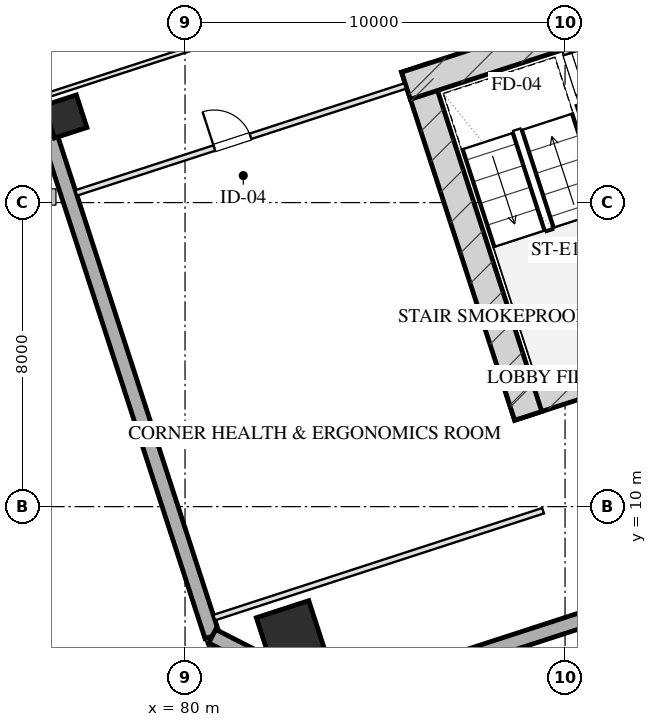
"""IFC4 building model, lengths in metres.
Left out: names, types, materials, properties, quantities, classifications, styles, units other than length and angle.
Written with IfcOpenShell. Run it as: python <this file> out.ifc"""

import sys

from ifc_helpers import new_model, si_unit, direction, frame, frame_2d, origin, origin_2d, place, context, subcontext, project, spatial, rectangle, hollow_rectangle, extrude, element, fill, save


model = new_model("IFC4")
c1 = context("Model", 3, precision=1e-05, world=origin(), true_north=direction((0.0, 1.0)))
c2 = subcontext(c1, "Body", "Model", "MODEL_VIEW")
j1 = project(units=[si_unit("LENGTHUNIT", "METRE"), si_unit("PLANEANGLEUNIT", "RADIAN")], contexts=[c1])
p1 = place(None, origin())
s1 = spatial("IfcSite", under=j1, at=p1, CompositionType="ELEMENT")
p2 = place(p1, origin())
s2 = spatial("IfcBuilding", under=s1, at=p2, CompositionType="ELEMENT")
p3 = place(p2, frame((0.0, 0.0, 88.55)))
s3 = spatial("IfcBuildingStorey", under=s2, at=p3, CompositionType="ELEMENT", Elevation=88.55)
p4 = place(p3, frame((88.559, 12.629, 0.0), z_axis=(0.0, 0.0, 1.0), x_axis=(0.951056072937, 0.309018358888, 0.0)))
e1 = element("IfcWall", 1, at=p4, inside=s3, PredefinedType="SHEAR", context=c2, shape_type="SweptSolid", body=[
    extrude(rectangle(XDim=16.55, YDim=0.75, at=frame_2d((8.275, 0.0))), origin(), (0.0, 0.0, 1.0), 3.45),
])
p5 = place(p3, frame((86.055, 21.546, 0.0), z_axis=(0.0, 0.0, 1.0), x_axis=(0.309023585745, -0.951054374604, 0.0)))
e2 = element("IfcWall", 2, at=p5, inside=s3, PredefinedType="SHEAR", context=c2, shape_type="SweptSolid", body=[
    extrude(rectangle(XDim=9.63, YDim=0.75, at=frame_2d((4.815, 0.0))), origin(), (0.0, 0.0, 1.0), 3.45),
])
p6 = place(p3, frame((85.814, 21.074, 0.0), z_axis=(0.0, 0.0, 1.0), x_axis=(0.95106580992, 0.308988390074, 0.0)))
e3 = element("IfcWall", 3, at=p6, inside=s3, PredefinedType="SHEAR", context=c2, shape_type="SweptSolid", body=[
    extrude(rectangle(XDim=4.295, YDim=0.75, at=frame_2d((2.147, 0.0))), origin(), (0.0, 0.0, 1.0), 3.45),
])
p7 = place(p3, frame((82.791, 6.612, 0.0), z_axis=(0.0, 0.0, 1.0), x_axis=(0.951056516295, 0.309016994375, 0.0)))
e4 = element("IfcColumn", 4, at=p7, inside=s3, PredefinedType="COLUMN", context=c2, shape_type="SweptSolid", body=[
    extrude(hollow_rectangle(XDim=1.45, YDim=1.45, WallThickness=0.05, at=origin_2d()), origin(), (0.0, 0.0, 1.0), 3.451),
])
p8 = place(p3, frame((76.851, 20.264, 0.0), z_axis=(0.0, 0.0, 1.0), x_axis=(0.951056516295, 0.309016994375, 0.0)))
e5 = element("IfcColumn", 5, at=p8, inside=s3, PredefinedType="COLUMN", context=c2, shape_type="SweptSolid", body=[
    extrude(hollow_rectangle(XDim=0.9, YDim=0.9, WallThickness=0.032, at=origin_2d()), origin(), (0.0, 0.0, 1.0), 3.451),
])
p9 = place(p3, frame((80.716, 6.59, 0.0), z_axis=(0.0, 0.0, 1.0), x_axis=(-0.309017542002, 0.95105633836, 0.0)))
e6 = element("IfcWall", 6, at=p9, inside=s3, PredefinedType="SOLIDWALL", context=c2, shape_type="SweptSolid", body=[
    extrude(rectangle(XDim=46.4, YDim=0.4, at=frame_2d((23.2, 0.0))), origin(), (0.0, 0.0, 1.0), 2.55),
])
p10 = place(p9, frame((28.4, 0.0, 0.75)))
e7 = element("IfcOpeningElement", 7, at=p10, cuts=e6, PredefinedType="OPENING", context=c2, shape_type="SweptSolid", body=[
    extrude(rectangle(XDim=2.4, YDim=1.4, at=frame_2d((1.2, 0.7))), frame((0.0, 0.21, 0.0), z_axis=(0.0, -1.0, 0.0), x_axis=(1.0, 0.0, 0.0)), (0.0, 0.0, 1.0), 0.42),
])
p11 = place(p9, frame((19.55, 0.0, 0.0)))
e8 = element("IfcOpeningElement", 8, at=p11, cuts=e6, PredefinedType="OPENING", context=c2, shape_type="SweptSolid", body=[
    extrude(rectangle(XDim=1.1, YDim=2.15, at=frame_2d((0.55, 1.075))), frame((0.0, 0.21, 0.0), z_axis=(0.0, -1.0, 0.0), x_axis=(1.0, 0.0, 0.0)), (0.0, 0.0, 1.0), 0.42),
])
p12 = place(p3, frame((111.953, 14.005, 0.0), z_axis=(0.0, 0.0, 1.0), x_axis=(-0.95105505922, -0.309021478754, 0.0)))
e9 = element("IfcWall", 9, at=p12, inside=s3, PredefinedType="SOLIDWALL", context=c2, shape_type="SweptSolid", body=[
    extrude(rectangle(XDim=29.4, YDim=0.4, at=frame_2d((14.7, 0.0))), origin(), (0.0, 0.0, 1.0), 2.55),
])
p13 = place(p3, frame((83.992, 4.92, 0.0), z_axis=(0.0, 0.0, 1.0), x_axis=(-0.891001999643, 0.45399937955, 0.0)))
e10 = element("IfcWall", 10, at=p13, inside=s3, PredefinedType="SOLIDWALL", context=c2, shape_type="SweptSolid", body=[
    extrude(rectangle(XDim=3.677, YDim=0.4, at=frame_2d((1.839, 0.0))), origin(), (0.0, 0.0, 1.0), 2.55),
])
p14 = place(p3, frame((89.899, 22.401, 0.0), z_axis=(0.0, 0.0, 1.0), x_axis=(0.308932062672, -0.951084108086, 0.0)))
e11 = element("IfcWall", 11, at=p14, inside=s3, PredefinedType="PARTITIONING", context=c2, shape_type="SweptSolid", body=[
    extrude(rectangle(XDim=1.9, YDim=0.2, at=frame_2d((0.95, 0.0))), origin(), (0.0, 0.0, 1.0), 3.155),
])
p15 = place(p14, frame((0.52, 0.0, 0.0)))
e12 = element("IfcOpeningElement", 12, at=p15, cuts=e11, PredefinedType="OPENING", context=c2, shape_type="SweptSolid", body=[
    extrude(rectangle(XDim=1.1, YDim=2.05, at=frame_2d((0.55, 1.025))), frame((0.0, 0.11, 0.0), z_axis=(0.0, -1.0, 0.0), x_axis=(1.0, 0.0, 0.0)), (0.0, 0.0, 1.0), 0.22),
])
p16 = place(p3, frame((80.767, 7.079, 0.0), z_axis=(0.0, 0.0, 1.0), x_axis=(0.951057133767, 0.309015093986, 0.0)))
e13 = element("IfcWall", 13, at=p16, inside=s3, PredefinedType="PARTITIONING", context=c2, shape_type="SweptSolid", body=[
    extrude(rectangle(XDim=9.1, YDim=0.15, at=frame_2d((4.55, 0.0))), origin(), (0.0, 0.0, 1.0), 3.155),
])
p17 = place(p3, frame((77.136, 18.254, 0.0), z_axis=(0.0, 0.0, 1.0), x_axis=(0.951057133767, 0.309015093986, 0.0)))
e14 = element("IfcWall", 14, at=p17, inside=s3, PredefinedType="PARTITIONING", context=c2, shape_type="SweptSolid", body=[
    extrude(rectangle(XDim=9.1, YDim=0.15, at=frame_2d((4.55, 0.0))), origin(), (0.0, 0.0, 1.0), 3.155),
])
p18 = place(p17, frame((3.822, 0.0, 0.0)))
e15 = element("IfcOpeningElement", 15, at=p18, cuts=e14, PredefinedType="OPENING", context=c2, shape_type="SweptSolid", body=[
    extrude(rectangle(XDim=1.0, YDim=2.05, at=frame_2d((0.5, 1.025))), frame((0.0, 0.085, 0.0), z_axis=(0.0, -1.0, 0.0), x_axis=(1.0, 0.0, 0.0)), (0.0, 0.0, 1.0), 0.17),
])
p19 = place(p3, frame((76.308, 20.803, 0.0), z_axis=(0.0, 0.0, 1.0), x_axis=(0.951054952586, 0.309021806935, 0.0)))
e16 = element("IfcWall", 16, at=p19, inside=s3, PredefinedType="PARTITIONING", context=c2, shape_type="SweptSolid", body=[
    extrude(rectangle(XDim=18.125, YDim=0.12, at=frame_2d((9.062, 0.0))), origin(), (0.0, 0.0, 1.0), 3.155),
])
p20 = place(p15, origin())
e17 = element("IfcDoor", 17, at=p20, inside=s3, OperationType="SINGLE_SWING_LEFT", PredefinedType="DOOR", context=c2, shape_type="SweptSolid", body=[
    extrude(rectangle(XDim=1.1, YDim=2.05, at=frame_2d((0.55, 1.025))), frame((0.0, 0.025, 0.0), z_axis=(0.0, -1.0, 0.0), x_axis=(1.0, 0.0, 0.0)), (0.0, 0.0, 1.0), 0.05),
])
fill(e12, e17)
p21 = place(p18, origin())
e18 = element("IfcDoor", 18, at=p21, inside=s3, OperationType="SINGLE_SWING_LEFT", PredefinedType="DOOR", context=c2, shape_type="SweptSolid", body=[
    extrude(rectangle(XDim=1.0, YDim=2.05, at=frame_2d((0.5, 1.025))), frame((0.0, 0.025, 0.0), z_axis=(0.0, -1.0, 0.0), x_axis=(1.0, 0.0, 0.0)), (0.0, 0.0, 1.0), 0.05),
])
fill(e15, e18)
save(model, sys.argv[1])
